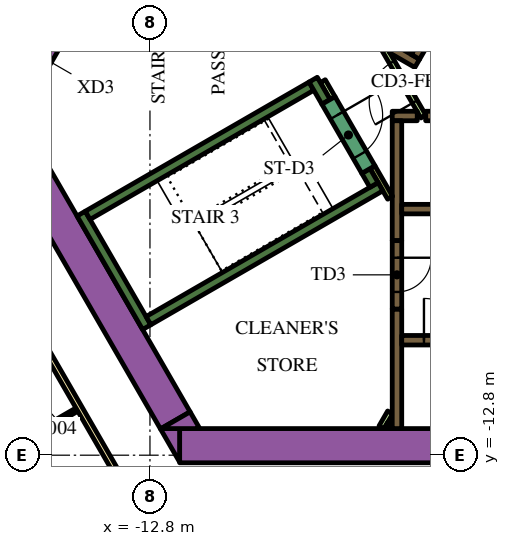
"""IFC4 building model, lengths in metres.
Left out: names, types, materials, properties, quantities, classifications, styles, units other than length and angle.
Written with IfcOpenShell. Run it as: python <this file> out.ifc"""

import sys

from ifc_helpers import new_model, si_unit, direction, frame, frame_2d, origin, place, context, subcontext, project, spatial, polyline, rectangle, outline, extrude, element, fill, save


model = new_model("IFC4")
c1 = context("Model", 3, precision=1e-05, world=origin(), true_north=direction((0.0, 1.0)))
c2 = subcontext(c1, "Body", "Model", "MODEL_VIEW")
j1 = project(units=[si_unit("LENGTHUNIT", "METRE"), si_unit("PLANEANGLEUNIT", "RADIAN")], contexts=[c1])
p1 = place(None, origin())
s1 = spatial("IfcSite", under=j1, at=p1, CompositionType="ELEMENT")
p2 = place(p1, origin())
s2 = spatial("IfcBuilding", under=s1, at=p2, CompositionType="ELEMENT")
p3 = place(p2, frame((0.0, 0.0, 99.3)))
s3 = spatial("IfcBuildingStorey", under=s2, at=p3, CompositionType="ELEMENT", Elevation=99.3)
p4 = place(p3, frame((-12.019, -12.55, 0.0), z_axis=(0.0, 0.0, 1.0), x_axis=(1.0, 0.0, 0.0)))
e1 = element("IfcWall", 1, at=p4, inside=s3, PredefinedType="SOLIDWALL", context=c2, shape_type="SweptSolid", body=[
    extrude(rectangle(XDim=21.63, YDim=0.9, at=frame_2d((10.815, 0.0))), origin(), (0.0, 0.0, 1.0), 3.9),
])
p5 = place(p3, origin())
e2 = element("IfcWall", 2, at=p5, inside=s3, PredefinedType="SOLIDWALL", context=c2, shape_type="SweptSolid", body=[
    extrude(outline(polyline([(-12.529, -12.1), (-12.021, -12.1), (-12.021, -12.98), (-12.529, -12.1)])), origin(), (0.0, 0.0, 1.0), 3.9),
])
p6 = place(p3, frame((-12.134, -11.883, 0.0), z_axis=(0.0, 0.0, 1.0), x_axis=(-0.500005339912, 0.866022320763, 0.0)))
e3 = element("IfcWall", 3, at=p6, inside=s3, PredefinedType="SOLIDWALL", context=c2, shape_type="SweptSolid", body=[
    extrude(rectangle(XDim=9.488, YDim=0.9, at=frame_2d((4.744, 0.0))), origin(), (0.0, 0.0, 1.0), 3.9),
])
e4 = element("IfcWall", 4, at=p5, inside=s3, PredefinedType="SOLIDWALL", context=c2, shape_type="SweptSolid", body=[
    extrude(outline(polyline([(-11.489, -12.1), (-12.505, -12.1), (-11.743, -11.66), (-11.489, -12.1)])), origin(), (0.0, 0.0, 1.0), 3.9),
])
p7 = place(p3, frame((-12.885, -9.431, 0.0), z_axis=(0.0, 0.0, 1.0), x_axis=(-0.500020560727, 0.866013532718, 0.0)))
e5 = element("IfcWall", 5, at=p7, inside=s3, PredefinedType="SOLIDWALL", context=c2, shape_type="SweptSolid", body=[
    extrude(rectangle(XDim=3.45, YDim=0.25, at=frame_2d((1.725, 0.0))), origin(), (0.0, 0.0, 1.0), 3.9),
])
p8 = place(p3, frame((-14.44, -6.49, 0.0), z_axis=(0.0, 0.0, 1.0), x_axis=(0.866022966069, 0.500004222222, 0.0)))
e6 = element("IfcWall", 6, at=p8, inside=s3, PredefinedType="SOLIDWALL", context=c2, shape_type="SweptSolid", body=[
    extrude(rectangle(XDim=6.8, YDim=0.25, at=frame_2d((3.4, 0.0))), origin(), (0.0, 0.0, 1.0), 3.9),
])
p9 = place(p3, frame((-8.168, -3.503, 0.0), z_axis=(0.0, 0.0, 1.0), x_axis=(-0.499952099219, 0.866053057547, 0.0)))
e7 = element("IfcWall", 7, at=p9, inside=s3, PredefinedType="SOLIDWALL", context=c2, shape_type="SweptSolid", body=[
    extrude(rectangle(XDim=0.675, YDim=0.25, at=frame_2d((0.337, 0.0))), origin(), (0.0, 0.0, 1.0), 3.9),
])
p10 = place(p3, frame((-12.84, -9.261, 0.0), z_axis=(0.0, 0.0, 1.0), x_axis=(0.866016039709, 0.500016218704, 0.0)))
e8 = element("IfcWall", 8, at=p10, inside=s3, PredefinedType="SOLIDWALL", context=c2, shape_type="SweptSolid", body=[
    extrude(rectangle(XDim=7.05, YDim=0.25, at=frame_2d((3.525, 0.0))), origin(), (0.0, 0.0, 1.0), 3.9),
])
p11 = place(p3, frame((-6.905, -5.69, 0.0), z_axis=(0.0, 0.0, 1.0), x_axis=(-0.500402024738, 0.865793170242, 0.0)))
e9 = element("IfcWall", 9, at=p11, inside=s3, PredefinedType="SOLIDWALL", context=c2, shape_type="SweptSolid", body=[
    extrude(rectangle(XDim=0.425, YDim=0.25, at=frame_2d((0.212, 0.0))), origin(), (0.0, 0.0, 1.0), 3.9),
])
p12 = place(p3, frame((-6.3, -12.1, 0.0), z_axis=(0.0, 0.0, 1.0), x_axis=(0.0, 1.0, 0.0)))
e10 = element("IfcWall", 10, at=p12, inside=s3, PredefinedType="SOLIDWALL", context=c2, shape_type="SweptSolid", body=[
    extrude(rectangle(XDim=3.146, YDim=0.25, at=frame_2d((1.573, 0.0))), origin(), (0.0, 0.0, 1.0), 3.9),
])
p13 = place(p3, frame((-5.545, -3.875, 0.0), z_axis=(0.0, 0.0, 1.0), x_axis=(1.0, 0.0, 0.0)))
e11 = element("IfcWall", 11, at=p13, inside=s3, PredefinedType="SOLIDWALL", context=c2, shape_type="SweptSolid", body=[
    extrude(rectangle(XDim=11.97, YDim=0.25, at=frame_2d((5.985, 0.0))), origin(), (0.0, 0.0, 1.0), 3.9),
])
p14 = place(p3, frame((-6.425, -3.875, 0.0), z_axis=(0.0, 0.0, 1.0), x_axis=(1.0, 0.0, 0.0)))
e12 = element("IfcWall", 12, at=p14, inside=s3, PredefinedType="SOLIDWALL", context=c2, shape_type="SweptSolid", body=[
    extrude(rectangle(XDim=0.658, YDim=0.25, at=frame_2d((0.329, 0.0))), origin(), (0.0, 0.0, 1.0), 3.9),
])
p15 = place(p3, frame((-6.3, -4.0, 0.0), z_axis=(0.0, 0.0, 1.0), x_axis=(0.0, -1.0, 0.0)))
e13 = element("IfcWall", 13, at=p15, inside=s3, PredefinedType="SOLIDWALL", context=c2, shape_type="SweptSolid", body=[
    extrude(rectangle(XDim=3.154, YDim=0.25, at=frame_2d((1.577, 0.0))), origin(), (0.0, 0.0, 1.0), 3.9),
])
e14 = element("IfcWall", 14, at=p5, inside=s3, PredefinedType="SOLIDWALL", context=c2, shape_type="SweptSolid", body=[
    extrude(outline(polyline([(-5.922, -2.257), (-5.922, -2.257), (-5.705, -2.382), (-5.83, -2.598), (-6.483, -2.221), (-6.591, -2.033), (-6.591, -2.033), (-6.7, -2.096), (-7.952, -1.373), (-7.827, -1.156), (-5.922, -2.257)])), origin(), (0.0, 0.0, 1.0), 3.9),
])
p16 = place(p3, frame((-6.708, -12.068, 0.0), z_axis=(0.0, 0.0, 1.0), x_axis=(0.500000789788, 0.8660249478, 0.0)))
e15 = element("IfcWall", 15, at=p16, inside=s3, PredefinedType="PARTITIONING", context=c2, shape_type="SweptSolid", body=[
    extrude(rectangle(XDim=0.456, YDim=0.15, at=frame_2d((0.228, 0.0))), origin(), (0.0, 0.0, 1.0), 2.75),
])
p17 = place(p3, frame((-6.534, -12.068, 0.0), z_axis=(0.0, 0.0, 1.0), x_axis=(0.500240224089, 0.865886665912, 0.0)))
e16 = element("IfcWall", 16, at=p17, inside=s3, PredefinedType="PARTITIONING", context=c2, shape_type="SweptSolid", body=[
    extrude(rectangle(XDim=0.109, YDim=0.15, at=frame_2d((0.054, 0.0))), origin(), (0.0, 0.0, 1.0), 2.75),
])
p18 = place(p3, frame((-6.48, -6.027, 0.0), z_axis=(0.0, 0.0, 1.0), x_axis=(-0.499927229454, 0.866067413802, 0.0)))
e17 = element("IfcWall", 17, at=p18, inside=s3, PredefinedType="PARTITIONING", context=c2, shape_type="SweptSolid", body=[
    extrude(rectangle(XDim=0.929, YDim=0.15, at=frame_2d((0.464, 0.0))), origin(), (0.0, 0.0, 1.0), 3.9),
])
p19 = place(p3, frame((-8.252, -2.958, 0.0), z_axis=(0.0, 0.0, 1.0), x_axis=(0.500174715838, -0.865924508047, 0.0)))
e18 = element("IfcWall", 18, at=p19, inside=s3, PredefinedType="PARTITIONING", context=c2, shape_type="SweptSolid", body=[
    extrude(rectangle(XDim=0.514, YDim=0.15, at=frame_2d((0.257, 0.0))), origin(), (0.0, 0.0, 1.0), 2.75),
])
p20 = place(p3, frame((-6.175, -9.775, 0.0), z_axis=(0.0, 0.0, 1.0), x_axis=(1.0, 0.0, 0.0)))
e19 = element("IfcWall", 19, at=p20, inside=s3, PredefinedType="SOLIDWALL", context=c2, shape_type="SweptSolid", body=[
    extrude(rectangle(XDim=12.35, YDim=0.25, at=frame_2d((6.175, 0.0))), origin(), (0.0, 0.0, 1.0), 3.9),
])
p21 = place(p20, frame((0.585, 0.0, 0.0)))
e20 = element("IfcOpeningElement", 20, at=p21, cuts=e19, PredefinedType="OPENING", context=c2, shape_type="SweptSolid", body=[
    extrude(rectangle(XDim=1.1, YDim=2.1, at=frame_2d((0.55, 1.05))), frame((0.0, 0.135, 0.0), z_axis=(0.0, -1.0, 0.0), x_axis=(1.0, 0.0, 0.0)), (0.0, 0.0, 1.0), 0.27),
])
p22 = place(p20, frame((3.105, 0.0, 0.0)))
e21 = element("IfcOpeningElement", 21, at=p22, cuts=e19, PredefinedType="OPENING", context=c2, shape_type="SweptSolid", body=[
    extrude(rectangle(XDim=1.1, YDim=2.1, at=frame_2d((0.55, 1.05))), frame((0.0, 0.135, 0.0), z_axis=(0.0, -1.0, 0.0), x_axis=(1.0, 0.0, 0.0)), (0.0, 0.0, 1.0), 0.27),
])
p23 = place(p20, frame((5.625, 0.0, 0.0)))
e22 = element("IfcOpeningElement", 22, at=p23, cuts=e19, PredefinedType="OPENING", context=c2, shape_type="SweptSolid", body=[
    extrude(rectangle(XDim=1.1, YDim=2.1, at=frame_2d((0.55, 1.05))), frame((0.0, 0.135, 0.0), z_axis=(0.0, -1.0, 0.0), x_axis=(1.0, 0.0, 0.0)), (0.0, 0.0, 1.0), 0.27),
])
p24 = place(p20, frame((8.145, 0.0, 0.0)))
e23 = element("IfcOpeningElement", 23, at=p24, cuts=e19, PredefinedType="OPENING", context=c2, shape_type="SweptSolid", body=[
    extrude(rectangle(XDim=1.1, YDim=2.1, at=frame_2d((0.55, 1.05))), frame((0.0, 0.135, 0.0), z_axis=(0.0, -1.0, 0.0), x_axis=(1.0, 0.0, 0.0)), (0.0, 0.0, 1.0), 0.27),
])
p25 = place(p20, frame((10.665, 0.0, 0.0)))
e24 = element("IfcOpeningElement", 24, at=p25, cuts=e19, PredefinedType="OPENING", context=c2, shape_type="SweptSolid", body=[
    extrude(rectangle(XDim=1.1, YDim=2.1, at=frame_2d((0.55, 1.05))), frame((0.0, 0.135, 0.0), z_axis=(0.0, -1.0, 0.0), x_axis=(1.0, 0.0, 0.0)), (0.0, 0.0, 1.0), 0.27),
])
p26 = place(p3, frame((-6.175, -6.325, 0.0), z_axis=(0.0, 0.0, 1.0), x_axis=(1.0, 0.0, 0.0)))
e25 = element("IfcWall", 25, at=p26, inside=s3, PredefinedType="SOLIDWALL", context=c2, shape_type="SweptSolid", body=[
    extrude(rectangle(XDim=12.35, YDim=0.25, at=frame_2d((6.175, 0.0))), origin(), (0.0, 0.0, 1.0), 3.9),
])
p27 = place(p26, frame((3.205, 0.0, 0.0)))
e26 = element("IfcOpeningElement", 26, at=p27, cuts=e25, PredefinedType="OPENING", context=c2, shape_type="SweptSolid", body=[
    extrude(rectangle(XDim=0.9, YDim=2.1, at=frame_2d((0.45, 1.05))), frame((0.0, 0.135, 0.0), z_axis=(0.0, -1.0, 0.0), x_axis=(1.0, 0.0, 0.0)), (0.0, 0.0, 1.0), 0.27),
])
p28 = place(p26, frame((8.145, 0.0, 0.0)))
e27 = element("IfcOpeningElement", 27, at=p28, cuts=e25, PredefinedType="OPENING", context=c2, shape_type="SweptSolid", body=[
    extrude(rectangle(XDim=1.1, YDim=2.1, at=frame_2d((0.55, 1.05))), frame((0.0, 0.135, 0.0), z_axis=(0.0, -1.0, 0.0), x_axis=(1.0, 0.0, 0.0)), (0.0, 0.0, 1.0), 0.27),
])
p29 = place(p26, frame((10.665, 0.0, 0.0)))
e28 = element("IfcOpeningElement", 28, at=p29, cuts=e25, PredefinedType="OPENING", context=c2, shape_type="SweptSolid", body=[
    extrude(rectangle(XDim=1.1, YDim=2.1, at=frame_2d((0.55, 1.05))), frame((0.0, 0.135, 0.0), z_axis=(0.0, -1.0, 0.0), x_axis=(1.0, 0.0, 0.0)), (0.0, 0.0, 1.0), 0.27),
])
p30 = place(p3, frame((-0.898, 6.194, 0.0), z_axis=(0.0, 0.0, 1.0), x_axis=(-0.499996202215, -0.866027596426, 0.0)))
e29 = element("IfcWall", 29, at=p30, inside=s3, PredefinedType="SOLIDWALL", context=c2, shape_type="SweptSolid", body=[
    extrude(rectangle(XDim=9.83, YDim=0.25, at=frame_2d((4.915, 0.0))), origin(), (0.0, 0.0, 1.0), 3.9),
])
p31 = place(p30, frame((0.585, 0.0, 0.0)))
e30 = element("IfcOpeningElement", 30, at=p31, cuts=e29, PredefinedType="OPENING", context=c2, shape_type="SweptSolid", body=[
    extrude(rectangle(XDim=1.1, YDim=2.1, at=frame_2d((0.55, 1.05))), frame((0.0, 0.135, 0.0), z_axis=(0.0, -1.0, 0.0), x_axis=(1.0, 0.0, 0.0)), (0.0, 0.0, 1.0), 0.27),
])
p32 = place(p30, frame((3.105, 0.0, 0.0)))
e31 = element("IfcOpeningElement", 31, at=p32, cuts=e29, PredefinedType="OPENING", context=c2, shape_type="SweptSolid", body=[
    extrude(rectangle(XDim=1.1, YDim=2.1, at=frame_2d((0.55, 1.05))), frame((0.0, 0.135, 0.0), z_axis=(0.0, -1.0, 0.0), x_axis=(1.0, 0.0, 0.0)), (0.0, 0.0, 1.0), 0.27),
])
p33 = place(p30, frame((5.625, 0.0, 0.0)))
e32 = element("IfcOpeningElement", 32, at=p33, cuts=e29, PredefinedType="OPENING", context=c2, shape_type="SweptSolid", body=[
    extrude(rectangle(XDim=1.1, YDim=2.1, at=frame_2d((0.55, 1.05))), frame((0.0, 0.135, 0.0), z_axis=(0.0, -1.0, 0.0), x_axis=(1.0, 0.0, 0.0)), (0.0, 0.0, 1.0), 0.27),
])
p34 = place(p30, frame((8.145, 0.0, 0.0)))
e33 = element("IfcOpeningElement", 33, at=p34, cuts=e29, PredefinedType="OPENING", context=c2, shape_type="SweptSolid", body=[
    extrude(rectangle(XDim=1.1, YDim=2.1, at=frame_2d((0.55, 1.05))), frame((0.0, 0.135, 0.0), z_axis=(0.0, -1.0, 0.0), x_axis=(1.0, 0.0, 0.0)), (0.0, 0.0, 1.0), 0.27),
])
p35 = place(p3, frame((-8.103, -3.466, 0.0), z_axis=(0.0, 0.0, 1.0), x_axis=(0.500078061341, -0.865980330357, 0.0)))
e34 = element("IfcWall", 34, at=p35, inside=s3, PredefinedType="SOLIDWALL", context=c2, shape_type="SweptSolid", body=[
    extrude(rectangle(XDim=2.1, YDim=0.4, at=frame_2d((1.05, 0.0))), origin(), (0.0, 0.0, 1.0), 3.9),
])
p36 = place(p35, frame((0.45, 0.0, 0.0)))
e35 = element("IfcOpeningElement", 35, at=p36, cuts=e34, PredefinedType="OPENING", context=c2, shape_type="SweptSolid", body=[
    extrude(rectangle(XDim=1.2, YDim=2.1, at=frame_2d((0.6, 1.05))), frame((0.0, 0.21, 0.0), z_axis=(0.0, -1.0, 0.0), x_axis=(1.0, 0.0, 0.0)), (0.0, 0.0, 1.0), 0.42),
])
p37 = place(p3, frame((-6.3, -7.154, 0.0), z_axis=(0.0, 0.0, 1.0), x_axis=(0.0, -1.0, 0.0)))
e36 = element("IfcWall", 36, at=p37, inside=s3, PredefinedType="SOLIDWALL", context=c2, shape_type="SweptSolid", body=[
    extrude(rectangle(XDim=1.8, YDim=0.25, at=frame_2d((0.9, 0.0))), origin(), (0.0, 0.0, 1.0), 3.9),
])
p38 = place(p37, frame((0.45, 0.0, 0.0)))
e37 = element("IfcOpeningElement", 37, at=p38, cuts=e36, PredefinedType="OPENING", context=c2, shape_type="SweptSolid", body=[
    extrude(rectangle(XDim=0.9, YDim=2.1, at=frame_2d((0.45, 1.05))), frame((0.0, 0.135, 0.0), z_axis=(0.0, -1.0, 0.0), x_axis=(1.0, 0.0, 0.0)), (0.0, 0.0, 1.0), 0.27),
])
p39 = place(p3, frame((-5.606, -3.89, 0.0), z_axis=(0.0, 0.0, 1.0), x_axis=(-0.500027713859, 0.866009402589, 0.0)))
e38 = element("IfcWall", 38, at=p39, inside=s3, PredefinedType="PARTITIONING", context=c2, shape_type="SweptSolid", body=[
    extrude(rectangle(XDim=2.1, YDim=0.15, at=frame_2d((1.05, 0.0))), origin(), (0.0, 0.0, 1.0), 2.75),
])
p40 = place(p39, frame((0.45, 0.0, 0.0)))
e39 = element("IfcOpeningElement", 39, at=p40, cuts=e38, PredefinedType="OPENING", context=c2, shape_type="SweptSolid", body=[
    extrude(rectangle(XDim=1.2, YDim=2.1, at=frame_2d((0.6, 1.05))), frame((0.0, 0.085, 0.0), z_axis=(0.0, -1.0, 0.0), x_axis=(1.0, 0.0, 0.0)), (0.0, 0.0, 1.0), 0.17),
])
p41 = place(p3, frame((-16.209, -2.976, 0.0), z_axis=(0.0, 0.0, 1.0), x_axis=(0.499954529098, 0.86605165483, 0.0)))
e40 = element("IfcWall", 40, at=p41, inside=s3, PredefinedType="SOLIDWALL", context=c2, shape_type="SweptSolid", body=[
    extrude(rectangle(XDim=1.7, YDim=0.9, at=frame_2d((0.85, 0.0))), origin(), (0.0, 0.0, 1.0), 3.9),
])
p42 = place(p41, frame((0.25, 0.0, 0.0)))
e41 = element("IfcOpeningElement", 41, at=p42, cuts=e40, PredefinedType="OPENING", context=c2, shape_type="SweptSolid", body=[
    extrude(rectangle(XDim=1.2, YDim=2.1, at=frame_2d((0.6, 1.05))), frame((0.0, 0.46, 0.0), z_axis=(0.0, -1.0, 0.0), x_axis=(1.0, 0.0, 0.0)), (0.0, 0.0, 1.0), 0.92),
])
p43 = place(p3, frame((-19.081, -3.9, 0.0), z_axis=(0.0, 0.0, 1.0), x_axis=(0.499998313975, 0.866026377209, 0.0)))
e42 = element("IfcWall", 42, at=p43, inside=s3, PredefinedType="PARTITIONING", context=c2, shape_type="SweptSolid", body=[
    extrude(rectangle(XDim=25.766, YDim=0.15, at=frame_2d((12.883, 0.0))), origin(), (0.0, 0.0, 1.0), 2.75),
])
p44 = place(p43, frame((19.306, 0.0, 0.0)))
e43 = element("IfcOpeningElement", 43, at=p44, cuts=e42, PredefinedType="OPENING", context=c2, shape_type="SweptSolid", body=[
    extrude(rectangle(XDim=1.0, YDim=2.1, at=frame_2d((0.5, 1.05))), frame((0.0, 0.085, 0.0), z_axis=(0.0, -1.0, 0.0), x_axis=(1.0, 0.0, 0.0)), (0.0, 0.0, 1.0), 0.17),
])
p45 = place(p43, frame((17.144, 0.0, 0.0)))
e44 = element("IfcOpeningElement", 44, at=p45, cuts=e42, PredefinedType="OPENING", context=c2, shape_type="SweptSolid", body=[
    extrude(rectangle(XDim=0.9, YDim=2.1, at=frame_2d((0.45, 1.05))), frame((0.0, 0.085, 0.0), z_axis=(0.0, -1.0, 0.0), x_axis=(1.0, 0.0, 0.0)), (0.0, 0.0, 1.0), 0.17),
])
p46 = place(p43, frame((9.955, 0.0, 0.0)))
e45 = element("IfcOpeningElement", 45, at=p46, cuts=e42, PredefinedType="OPENING", context=c2, shape_type="SweptSolid", body=[
    extrude(rectangle(XDim=1.1, YDim=2.1, at=frame_2d((0.55, 1.05))), frame((0.0, 0.085, 0.0), z_axis=(0.0, -1.0, 0.0), x_axis=(1.0, 0.0, 0.0)), (0.0, 0.0, 1.0), 0.17),
])
p47 = place(p43, frame((8.648, 0.0, 0.0)))
e46 = element("IfcOpeningElement", 46, at=p47, cuts=e42, PredefinedType="OPENING", context=c2, shape_type="SweptSolid", body=[
    extrude(rectangle(XDim=1.0, YDim=2.1, at=frame_2d((0.5, 1.05))), frame((0.0, 0.085, 0.0), z_axis=(0.0, -1.0, 0.0), x_axis=(1.0, 0.0, 0.0)), (0.0, 0.0, 1.0), 0.17),
])
p48 = place(p43, frame((1.553, 0.0, 0.0)))
e47 = element("IfcOpeningElement", 47, at=p48, cuts=e42, PredefinedType="OPENING", context=c2, shape_type="SweptSolid", body=[
    extrude(rectangle(XDim=0.9, YDim=2.1, at=frame_2d((0.45, 1.05))), frame((0.0, 0.085, 0.0), z_axis=(0.0, -1.0, 0.0), x_axis=(1.0, 0.0, 0.0)), (0.0, 0.0, 1.0), 0.17),
])
p49 = place(p3, frame((-12.918, -14.575, 0.0), z_axis=(0.0, 0.0, 1.0), x_axis=(-0.500009150678, 0.866020120573, 0.0)))
e48 = element("IfcWall", 48, at=p49, inside=s3, PredefinedType="PARTITIONING", context=c2, shape_type="SweptSolid", body=[
    extrude(rectangle(XDim=5.258, YDim=0.15, at=frame_2d((2.629, 0.0))), origin(), (0.0, 0.0, 1.0), 2.75),
])
p50 = place(p49, frame((0.18, 0.0, 0.0)))
e49 = element("IfcOpeningElement", 49, at=p50, cuts=e48, PredefinedType="OPENING", context=c2, shape_type="SweptSolid", body=[
    extrude(rectangle(XDim=1.0, YDim=2.1, at=frame_2d((0.5, 1.05))), frame((0.0, 0.085, 0.0), z_axis=(0.0, -1.0, 0.0), x_axis=(1.0, 0.0, 0.0)), (0.0, 0.0, 1.0), 0.17),
])
p51 = place(p3, frame((-16.974, -12.9, 0.0), z_axis=(0.0, 0.0, 1.0), x_axis=(0.865997922154, 0.500047596559, 0.0)))
e50 = element("IfcWall", 50, at=p51, inside=s3, PredefinedType="PARTITIONING", context=c2, shape_type="SweptSolid", body=[
    extrude(rectangle(XDim=2.6, YDim=0.1, at=frame_2d((1.3, 0.0))), origin(), (0.0, 0.0, 1.0), 2.75),
])
p52 = place(p51, frame((1.1, 0.0, 0.0)))
e51 = element("IfcOpeningElement", 51, at=p52, cuts=e50, PredefinedType="OPENING", context=c2, shape_type="SweptSolid", body=[
    extrude(rectangle(XDim=0.9, YDim=2.1, at=frame_2d((0.45, 1.05))), frame((0.0, 0.06, 0.0), z_axis=(0.0, -1.0, 0.0), x_axis=(1.0, 0.0, 0.0)), (0.0, 0.0, 1.0), 0.12),
])
p53 = place(p21, origin())
e52 = element("IfcDoor", 52, at=p53, inside=s3, OperationType="DOUBLE_DOOR_SLIDING", PredefinedType="DOOR", context=c2, shape_type="SweptSolid", body=[
    extrude(rectangle(XDim=1.1, YDim=2.1, at=frame_2d((0.55, 1.05))), frame((0.0, 0.025, 0.0), z_axis=(0.0, -1.0, 0.0), x_axis=(1.0, 0.0, 0.0)), (0.0, 0.0, 1.0), 0.05),
])
fill(e20, e52)
p54 = place(p36, origin())
e53 = element("IfcDoor", 53, at=p54, inside=s3, OperationType="SINGLE_SWING_LEFT", PredefinedType="DOOR", context=c2, shape_type="SweptSolid", body=[
    extrude(rectangle(XDim=1.2, YDim=2.1, at=frame_2d((0.6, 1.05))), frame((0.0, 0.025, 0.0), z_axis=(0.0, -1.0, 0.0), x_axis=(1.0, 0.0, 0.0)), (0.0, 0.0, 1.0), 0.05),
])
fill(e35, e53)
p55 = place(p38, origin())
e54 = element("IfcDoor", 54, at=p55, inside=s3, OperationType="SINGLE_SWING_LEFT", PredefinedType="DOOR", context=c2, shape_type="SweptSolid", body=[
    extrude(rectangle(XDim=0.9, YDim=2.1, at=frame_2d((0.45, 1.05))), frame((0.0, 0.025, 0.0), z_axis=(0.0, -1.0, 0.0), x_axis=(1.0, 0.0, 0.0)), (0.0, 0.0, 1.0), 0.05),
])
fill(e37, e54)
p56 = place(p40, origin())
e55 = element("IfcDoor", 55, at=p56, inside=s3, OperationType="SINGLE_SWING_LEFT", PredefinedType="DOOR", context=c2, shape_type="SweptSolid", body=[
    extrude(rectangle(XDim=1.2, YDim=2.1, at=frame_2d((0.6, 1.05))), frame((0.0, 0.025, 0.0), z_axis=(0.0, -1.0, 0.0), x_axis=(1.0, 0.0, 0.0)), (0.0, 0.0, 1.0), 0.05),
])
fill(e39, e55)
p57 = place(p52, origin())
e56 = element("IfcDoor", 56, at=p57, inside=s3, OperationType="SINGLE_SWING_LEFT", PredefinedType="DOOR", context=c2, shape_type="SweptSolid", body=[
    extrude(rectangle(XDim=0.9, YDim=2.1, at=frame_2d((0.45, 1.05))), frame((0.0, 0.025, 0.0), z_axis=(0.0, -1.0, 0.0), x_axis=(1.0, 0.0, 0.0)), (0.0, 0.0, 1.0), 0.05),
])
fill(e51, e56)
save(model, sys.argv[1])
